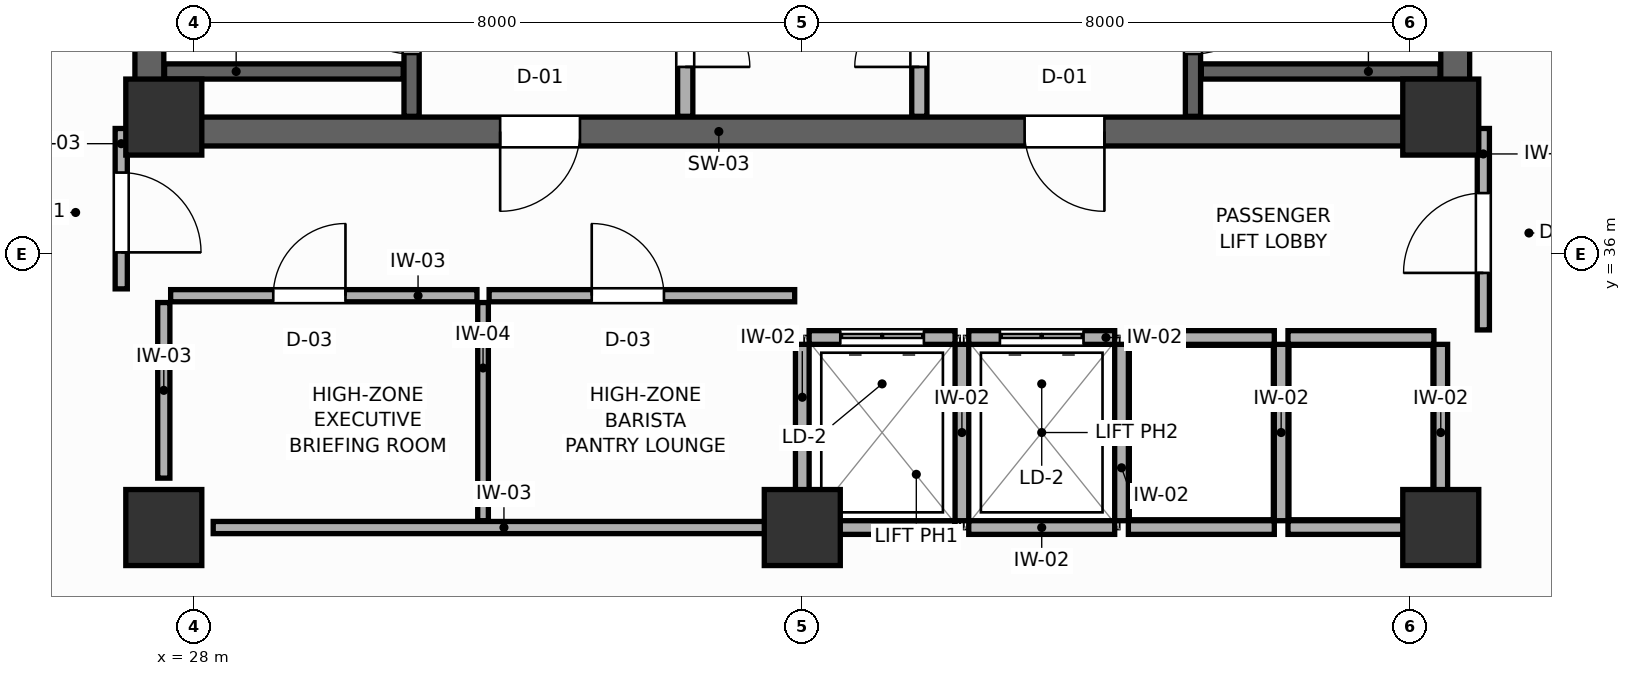
"""IFC4 building model, lengths in metres.
Left out: names, types, materials, properties, quantities, classifications, styles, units other than length and angle.
Written with IfcOpenShell. Run it as: python <this file> out.ifc"""

import sys

from ifc_helpers import new_model, si_unit, direction, frame, frame_2d, origin, origin_2d, place, context, subcontext, project, spatial, rectangle, extrude, source, transform, mapped, element, fill, save


model = new_model("IFC4")
c1 = context("Model", 3, precision=1e-05, world=origin(), true_north=direction((0.0, 1.0)))
c2 = subcontext(c1, "Body", "Model", "MODEL_VIEW")
j1 = project(units=[si_unit("LENGTHUNIT", "METRE"), si_unit("PLANEANGLEUNIT", "RADIAN")], contexts=[c1])
p1 = place(None, origin())
s1 = spatial("IfcSite", under=j1, at=p1, CompositionType="ELEMENT")
p2 = place(p1, origin())
s2 = spatial("IfcBuilding", under=s1, at=p2, CompositionType="ELEMENT")
p3 = place(p2, frame((0.0, 0.0, 231.0)))
s3 = spatial("IfcBuildingStorey", under=s2, at=p3, CompositionType="ELEMENT", Elevation=231.0)
p4 = place(p3, frame((27.22, 37.61, 0.0), z_axis=(0.0, 0.0, 1.0), x_axis=(1.0, 0.0, 0.0)))
e1 = element("IfcWall", 1, at=p4, inside=s3, PredefinedType="SHEAR", context=c2, shape_type="SweptSolid", body=[
    extrude(rectangle(XDim=17.56, YDim=0.38, at=frame_2d((8.78, 0.0))), origin(), (0.0, 0.0, 1.0), 3.6),
])
p5 = place(p4, frame((4.805, 0.0, 0.0)))
e2 = element("IfcOpeningElement", 2, at=p5, cuts=e1, PredefinedType="OPENING", context=c2, shape_type="SweptSolid", body=[
    extrude(rectangle(XDim=1.05, YDim=2.1, at=frame_2d((0.525, 1.05))), frame((0.0, 0.2, 0.0), z_axis=(0.0, -1.0, 0.0), x_axis=(1.0, 0.0, 0.0)), (0.0, 0.0, 1.0), 0.4),
])
p6 = place(p4, frame((11.705, 0.0, 0.0)))
e3 = element("IfcOpeningElement", 3, at=p6, cuts=e1, PredefinedType="OPENING", context=c2, shape_type="SweptSolid", body=[
    extrude(rectangle(XDim=1.05, YDim=2.1, at=frame_2d((0.525, 1.05))), frame((0.0, 0.2, 0.0), z_axis=(0.0, -1.0, 0.0), x_axis=(1.0, 0.0, 0.0)), (0.0, 0.0, 1.0), 0.4),
])
for number, where, z_axis, x_axis in (
    (4, (27.41, 37.8, 0.0), (0.0, 0.0, 1.0), (0.0, 1.0, 0.0)),
    (5, (44.59, 37.8, 0.0), (0.0, 0.0, 1.0), (0.0, 1.0, 0.0)),
):
    element("IfcWall", number, at=place(p3, frame(where, z_axis=z_axis, x_axis=x_axis)), inside=s3, PredefinedType="SHEAR", context=c2, shape_type="SweptSolid", body=[
        extrude(rectangle(XDim=9.0, YDim=0.38, at=frame_2d((4.5, 0.0))), origin(), (0.0, 0.0, 1.0), 3.6),
    ])
m1 = source(origin(), c2, "Body", "SweptSolid", [
    extrude(rectangle(XDim=1.0, YDim=1.0, at=origin_2d()), origin(), (0.0, 0.0, 1.0), 3.6),
])
for number, where, z_axis, x_axis in (
    (6, (27.6, 37.8, 0.0), (0.0, 0.0, 1.0), (1.0, 0.0, 0.0)),
    (7, (44.4, 37.8, 0.0), (0.0, 0.0, 1.0), (1.0, 0.0, 0.0)),
    (8, (27.6, 32.4, 0.0), (0.0, 0.0, 1.0), (1.0, 0.0, 0.0)),
    (9, (44.4, 32.4, 0.0), (0.0, 0.0, 1.0), (1.0, 0.0, 0.0)),
    (10, (36.0, 32.4, 0.0), (0.0, 0.0, 1.0), (1.0, 0.0, 0.0)),
):
    element("IfcColumn", number, at=place(p3, frame(where, z_axis=z_axis, x_axis=x_axis)), inside=s3, PredefinedType="COLUMN", context=c2, shape_type="MappedRepresentation", body=[
        mapped(m1, transform((0.0, 0.0, 0.0), scale=1.0)),
    ])
p7 = place(p3, frame((30.86, 37.81, 0.0), z_axis=(0.0, 0.0, 1.0), x_axis=(0.0, 1.0, 0.0)))
e11 = element("IfcWall", 11, at=p7, inside=s3, PredefinedType="SHEAR", context=c2, shape_type="SweptSolid", body=[
    extrude(rectangle(XDim=8.98, YDim=0.2, at=frame_2d((4.49, 0.0))), origin(), (0.0, 0.0, 1.0), 3.6),
])
p8 = place(p7, frame((0.82, 0.0, 0.0)))
e12 = element("IfcOpeningElement", 12, at=p8, cuts=e11, PredefinedType="OPENING", context=c2, shape_type="SweptSolid", body=[
    extrude(rectangle(XDim=1.05, YDim=2.1, at=frame_2d((0.525, 1.05))), frame((0.0, 0.11, 0.0), z_axis=(0.0, -1.0, 0.0), x_axis=(1.0, 0.0, 0.0)), (0.0, 0.0, 1.0), 0.22),
])
p9 = place(p3, frame((27.61, 38.4, 0.0), z_axis=(0.0, 0.0, 1.0), x_axis=(1.0, 0.0, 0.0)))
e13 = element("IfcWall", 13, at=p9, inside=s3, PredefinedType="SHEAR", context=c2, shape_type="SweptSolid", body=[
    extrude(rectangle(XDim=3.14, YDim=0.2, at=frame_2d((1.57, 0.0))), origin(), (0.0, 0.0, 1.0), 3.6),
])
p10 = place(p3, frame((41.14, 37.81, 0.0), z_axis=(0.0, 0.0, 1.0), x_axis=(0.0, 1.0, 0.0)))
e14 = element("IfcWall", 14, at=p10, inside=s3, PredefinedType="SHEAR", context=c2, shape_type="SweptSolid", body=[
    extrude(rectangle(XDim=8.98, YDim=0.2, at=frame_2d((4.49, 0.0))), origin(), (0.0, 0.0, 1.0), 3.6),
])
p11 = place(p10, frame((0.82, 0.0, 0.0)))
e15 = element("IfcOpeningElement", 15, at=p11, cuts=e14, PredefinedType="OPENING", context=c2, shape_type="SweptSolid", body=[
    extrude(rectangle(XDim=1.05, YDim=2.1, at=frame_2d((0.525, 1.05))), frame((0.0, 0.11, 0.0), z_axis=(0.0, -1.0, 0.0), x_axis=(1.0, 0.0, 0.0)), (0.0, 0.0, 1.0), 0.22),
])
p12 = place(p3, frame((41.25, 38.4, 0.0), z_axis=(0.0, 0.0, 1.0), x_axis=(1.0, 0.0, 0.0)))
e16 = element("IfcWall", 16, at=p12, inside=s3, PredefinedType="SHEAR", context=c2, shape_type="SweptSolid", body=[
    extrude(rectangle(XDim=3.14, YDim=0.2, at=frame_2d((1.57, 0.0))), origin(), (0.0, 0.0, 1.0), 3.6),
])
p13 = place(p3, frame((34.46, 37.81, 0.0), z_axis=(0.0, 0.0, 1.0), x_axis=(0.0, 1.0, 0.0)))
e17 = element("IfcWall", 17, at=p13, inside=s3, PredefinedType="PARTITIONING", context=c2, shape_type="SweptSolid", body=[
    extrude(rectangle(XDim=8.98, YDim=0.2, at=frame_2d((4.49, 0.0))), origin(), (0.0, 0.0, 1.0), 3.41),
])
p14 = place(p13, frame((0.65, 0.0, 0.0)))
e18 = element("IfcOpeningElement", 18, at=p14, cuts=e17, PredefinedType="OPENING", context=c2, shape_type="SweptSolid", body=[
    extrude(rectangle(XDim=0.85, YDim=2.05, at=frame_2d((0.425, 1.025))), frame((0.0, 0.11, 0.0), z_axis=(0.0, -1.0, 0.0), x_axis=(1.0, 0.0, 0.0)), (0.0, 0.0, 1.0), 0.22),
])
p15 = place(p3, frame((37.54, 37.81, 0.0), z_axis=(0.0, 0.0, 1.0), x_axis=(0.0, 1.0, 0.0)))
e19 = element("IfcWall", 19, at=p15, inside=s3, PredefinedType="PARTITIONING", context=c2, shape_type="SweptSolid", body=[
    extrude(rectangle(XDim=8.98, YDim=0.2, at=frame_2d((4.49, 0.0))), origin(), (0.0, 0.0, 1.0), 3.41),
])
p16 = place(p15, frame((0.65, 0.0, 0.0)))
e20 = element("IfcOpeningElement", 20, at=p16, cuts=e19, PredefinedType="OPENING", context=c2, shape_type="SweptSolid", body=[
    extrude(rectangle(XDim=0.85, YDim=2.05, at=frame_2d((0.425, 1.025))), frame((0.0, 0.11, 0.0), z_axis=(0.0, -1.0, 0.0), x_axis=(1.0, 0.0, 0.0)), (0.0, 0.0, 1.0), 0.22),
])
p17 = place(p3, frame((36.09, 34.9, 0.0), z_axis=(0.0, 0.0, 1.0), x_axis=(1.0, 0.0, 0.0)))
e21 = element("IfcWall", 21, at=p17, inside=s3, PredefinedType="PARTITIONING", context=c2, shape_type="SweptSolid", body=[
    extrude(rectangle(XDim=1.92, YDim=0.18, at=frame_2d((0.96, 0.0))), origin(), (0.0, 0.0, 1.0), 3.41),
])
p18 = place(p17, frame((0.41, 0.0, 0.0)))
e22 = element("IfcOpeningElement", 22, at=p18, cuts=e21, PredefinedType="OPENING", context=c2, shape_type="SweptSolid", body=[
    extrude(rectangle(XDim=1.1, YDim=2.1, at=frame_2d((0.55, 1.05))), frame((0.0, 0.1, 0.0), z_axis=(0.0, -1.0, 0.0), x_axis=(1.0, 0.0, 0.0)), (0.0, 0.0, 1.0), 0.2),
])
p19 = place(p3, frame((36.09, 32.4, 0.0), z_axis=(0.0, 0.0, 1.0), x_axis=(1.0, 0.0, 0.0)))
e23 = element("IfcWall", 23, at=p19, inside=s3, PredefinedType="PARTITIONING", context=c2, shape_type="SweptSolid", body=[
    extrude(rectangle(XDim=1.92, YDim=0.18, at=frame_2d((0.96, 0.0))), origin(), (0.0, 0.0, 1.0), 2.96),
])
p20 = place(p3, frame((36.0, 32.49, 0.0), z_axis=(0.0, 0.0, 1.0), x_axis=(0.0, 1.0, 0.0)))
e24 = element("IfcWall", 24, at=p20, inside=s3, PredefinedType="PARTITIONING", context=c2, shape_type="SweptSolid", body=[
    extrude(rectangle(XDim=2.32, YDim=0.18, at=frame_2d((1.16, 0.0))), origin(), (0.0, 0.0, 1.0), 3.41),
])
p21 = place(p3, frame((38.19, 34.9, 0.0), z_axis=(0.0, 0.0, 1.0), x_axis=(1.0, 0.0, 0.0)))
e25 = element("IfcWall", 25, at=p21, inside=s3, PredefinedType="PARTITIONING", context=c2, shape_type="SweptSolid", body=[
    extrude(rectangle(XDim=1.92, YDim=0.18, at=frame_2d((0.96, 0.0))), origin(), (0.0, 0.0, 1.0), 3.41),
])
p22 = place(p21, frame((0.41, 0.0, 0.0)))
e26 = element("IfcOpeningElement", 26, at=p22, cuts=e25, PredefinedType="OPENING", context=c2, shape_type="SweptSolid", body=[
    extrude(rectangle(XDim=1.1, YDim=2.1, at=frame_2d((0.55, 1.05))), frame((0.0, 0.1, 0.0), z_axis=(0.0, -1.0, 0.0), x_axis=(1.0, 0.0, 0.0)), (0.0, 0.0, 1.0), 0.2),
])
p23 = place(p3, frame((38.19, 32.4, 0.0), z_axis=(0.0, 0.0, 1.0), x_axis=(1.0, 0.0, 0.0)))
e27 = element("IfcWall", 27, at=p23, inside=s3, PredefinedType="PARTITIONING", context=c2, shape_type="SweptSolid", body=[
    extrude(rectangle(XDim=1.92, YDim=0.18, at=frame_2d((0.96, 0.0))), origin(), (0.0, 0.0, 1.0), 2.96),
])
p24 = place(p3, frame((38.1, 32.49, 0.0), z_axis=(0.0, 0.0, 1.0), x_axis=(0.0, 1.0, 0.0)))
e28 = element("IfcWall", 28, at=p24, inside=s3, PredefinedType="PARTITIONING", context=c2, shape_type="SweptSolid", body=[
    extrude(rectangle(XDim=2.32, YDim=0.18, at=frame_2d((1.16, 0.0))), origin(), (0.0, 0.0, 1.0), 3.41),
])
p25 = place(p3, frame((40.29, 34.9, 0.0), z_axis=(0.0, 0.0, 1.0), x_axis=(1.0, 0.0, 0.0)))
e29 = element("IfcWall", 29, at=p25, inside=s3, PredefinedType="PARTITIONING", context=c2, shape_type="SweptSolid", body=[
    extrude(rectangle(XDim=1.92, YDim=0.18, at=frame_2d((0.96, 0.0))), origin(), (0.0, 0.0, 1.0), 3.41),
])
p26 = place(p3, frame((40.29, 32.4, 0.0), z_axis=(0.0, 0.0, 1.0), x_axis=(1.0, 0.0, 0.0)))
e30 = element("IfcWall", 30, at=p26, inside=s3, PredefinedType="PARTITIONING", context=c2, shape_type="SweptSolid", body=[
    extrude(rectangle(XDim=1.92, YDim=0.18, at=frame_2d((0.96, 0.0))), origin(), (0.0, 0.0, 1.0), 2.96),
])
p27 = place(p3, frame((40.2, 32.49, 0.0), z_axis=(0.0, 0.0, 1.0), x_axis=(0.0, 1.0, 0.0)))
e31 = element("IfcWall", 31, at=p27, inside=s3, PredefinedType="PARTITIONING", context=c2, shape_type="SweptSolid", body=[
    extrude(rectangle(XDim=2.32, YDim=0.18, at=frame_2d((1.16, 0.0))), origin(), (0.0, 0.0, 1.0), 3.41),
])
p28 = place(p3, frame((42.39, 34.9, 0.0), z_axis=(0.0, 0.0, 1.0), x_axis=(1.0, 0.0, 0.0)))
e32 = element("IfcWall", 32, at=p28, inside=s3, PredefinedType="PARTITIONING", context=c2, shape_type="SweptSolid", body=[
    extrude(rectangle(XDim=1.92, YDim=0.18, at=frame_2d((0.96, 0.0))), origin(), (0.0, 0.0, 1.0), 3.41),
])
p29 = place(p3, frame((42.39, 32.4, 0.0), z_axis=(0.0, 0.0, 1.0), x_axis=(1.0, 0.0, 0.0)))
e33 = element("IfcWall", 33, at=p29, inside=s3, PredefinedType="PARTITIONING", context=c2, shape_type="SweptSolid", body=[
    extrude(rectangle(XDim=1.92, YDim=0.18, at=frame_2d((0.96, 0.0))), origin(), (0.0, 0.0, 1.0), 2.96),
])
for number, where, z_axis, x_axis in (
    (34, (42.3, 32.49, 0.0), (0.0, 0.0, 1.0), (0.0, 1.0, 0.0)),
    (35, (44.4, 32.49, 0.0), (0.0, 0.0, 1.0), (0.0, 1.0, 0.0)),
):
    element("IfcWall", number, at=place(p3, frame(where, z_axis=z_axis, x_axis=x_axis)), inside=s3, PredefinedType="PARTITIONING", context=c2, shape_type="SweptSolid", body=[
        extrude(rectangle(XDim=2.32, YDim=0.18, at=frame_2d((1.16, 0.0))), origin(), (0.0, 0.0, 1.0), 3.41),
    ])
p30 = place(p3, frame((28.25, 32.4, 0.0), z_axis=(0.0, 0.0, 1.0), x_axis=(1.0, 0.0, 0.0)))
e36 = element("IfcWall", 36, at=p30, inside=s3, PredefinedType="PARTITIONING", context=c2, shape_type="SweptSolid", body=[
    extrude(rectangle(XDim=7.65, YDim=0.16, at=frame_2d((3.825, 0.0))), origin(), (0.0, 0.0, 1.0), 2.96),
])
p31 = place(p3, frame((27.6, 33.05, 0.0), z_axis=(0.0, 0.0, 1.0), x_axis=(0.0, 1.0, 0.0)))
e37 = element("IfcWall", 37, at=p31, inside=s3, PredefinedType="PARTITIONING", context=c2, shape_type="SweptSolid", body=[
    extrude(rectangle(XDim=2.31, YDim=0.16, at=frame_2d((1.155, 0.0))), origin(), (0.0, 0.0, 1.0), 3.41),
])
p32 = place(p3, frame((31.8, 32.49, 0.0), z_axis=(0.0, 0.0, 1.0), x_axis=(0.0, 1.0, 0.0)))
e38 = element("IfcWall", 38, at=p32, inside=s3, PredefinedType="PARTITIONING", context=c2, shape_type="SweptSolid", body=[
    extrude(rectangle(XDim=2.87, YDim=0.14, at=frame_2d((1.435, 0.0))), origin(), (0.0, 0.0, 1.0), 3.41),
])
p33 = place(p3, frame((27.69, 35.45, 0.0), z_axis=(0.0, 0.0, 1.0), x_axis=(1.0, 0.0, 0.0)))
e39 = element("IfcWall", 39, at=p33, inside=s3, PredefinedType="PARTITIONING", context=c2, shape_type="SweptSolid", body=[
    extrude(rectangle(XDim=4.03, YDim=0.16, at=frame_2d((2.015, 0.0))), origin(), (0.0, 0.0, 1.0), 3.41),
])
p34 = place(p33, frame((1.35, 0.0, 0.0)))
e40 = element("IfcOpeningElement", 40, at=p34, cuts=e39, PredefinedType="OPENING", context=c2, shape_type="SweptSolid", body=[
    extrude(rectangle(XDim=0.95, YDim=2.05, at=frame_2d((0.475, 1.025))), frame((0.0, 0.09, 0.0), z_axis=(0.0, -1.0, 0.0), x_axis=(1.0, 0.0, 0.0)), (0.0, 0.0, 1.0), 0.18),
])
p35 = place(p3, frame((31.88, 35.45, 0.0), z_axis=(0.0, 0.0, 1.0), x_axis=(1.0, 0.0, 0.0)))
e41 = element("IfcWall", 41, at=p35, inside=s3, PredefinedType="PARTITIONING", context=c2, shape_type="SweptSolid", body=[
    extrude(rectangle(XDim=4.02, YDim=0.16, at=frame_2d((2.01, 0.0))), origin(), (0.0, 0.0, 1.0), 3.41),
])
p36 = place(p35, frame((1.35, 0.0, 0.0)))
e42 = element("IfcOpeningElement", 42, at=p36, cuts=e41, PredefinedType="OPENING", context=c2, shape_type="SweptSolid", body=[
    extrude(rectangle(XDim=0.95, YDim=2.05, at=frame_2d((0.475, 1.025))), frame((0.0, 0.09, 0.0), z_axis=(0.0, -1.0, 0.0), x_axis=(1.0, 0.0, 0.0)), (0.0, 0.0, 1.0), 0.18),
])
p37 = place(p3, frame((27.04, 35.54, 0.0), z_axis=(0.0, 0.0, 1.0), x_axis=(0.0, 1.0, 0.0)))
e43 = element("IfcWall", 43, at=p37, inside=s3, PredefinedType="PARTITIONING", context=c2, shape_type="SweptSolid", body=[
    extrude(rectangle(XDim=2.11, YDim=0.16, at=frame_2d((1.055, 0.0))), origin(), (0.0, 0.0, 1.0), 3.41),
])
p38 = place(p37, frame((0.48, 0.0, 0.0)))
e44 = element("IfcOpeningElement", 44, at=p38, cuts=e43, PredefinedType="OPENING", context=c2, shape_type="SweptSolid", body=[
    extrude(rectangle(XDim=1.05, YDim=2.1, at=frame_2d((0.525, 1.05))), frame((0.0, 0.09, 0.0), z_axis=(0.0, -1.0, 0.0), x_axis=(1.0, 0.0, 0.0)), (0.0, 0.0, 1.0), 0.18),
])
p39 = place(p3, frame((44.96, 35.0, 0.0), z_axis=(0.0, 0.0, 1.0), x_axis=(0.0, 1.0, 0.0)))
e45 = element("IfcWall", 45, at=p39, inside=s3, PredefinedType="PARTITIONING", context=c2, shape_type="SweptSolid", body=[
    extrude(rectangle(XDim=2.65, YDim=0.16, at=frame_2d((1.325, 0.0))), origin(), (0.0, 0.0, 1.0), 3.41),
])
p40 = place(p39, frame((0.75, 0.0, 0.0)))
e46 = element("IfcOpeningElement", 46, at=p40, cuts=e45, PredefinedType="OPENING", context=c2, shape_type="SweptSolid", body=[
    extrude(rectangle(XDim=1.05, YDim=2.1, at=frame_2d((0.525, 1.05))), frame((0.0, 0.09, 0.0), z_axis=(0.0, -1.0, 0.0), x_axis=(1.0, 0.0, 0.0)), (0.0, 0.0, 1.0), 0.18),
])
p41 = place(p8, origin())
e47 = element("IfcDoor", 47, at=p41, inside=s3, OperationType="SINGLE_SWING_RIGHT", PredefinedType="DOOR", context=c2, shape_type="SweptSolid", body=[
    extrude(rectangle(XDim=1.05, YDim=2.1, at=frame_2d((0.525, 1.05))), frame((0.0, 0.025, 0.0), z_axis=(0.0, -1.0, 0.0), x_axis=(1.0, 0.0, 0.0)), (0.0, 0.0, 1.0), 0.05),
])
fill(e12, e47)
p42 = place(p11, frame((1.05, 0.0, 0.0), z_axis=(0.0, 0.0, 1.0), x_axis=(-1.0, 0.0, 0.0)))
e48 = element("IfcDoor", 48, at=p42, inside=s3, OperationType="SINGLE_SWING_LEFT", PredefinedType="DOOR", context=c2, shape_type="SweptSolid", body=[
    extrude(rectangle(XDim=1.05, YDim=2.1, at=frame_2d((0.525, 1.05))), frame((0.0, 0.025, 0.0), z_axis=(0.0, -1.0, 0.0), x_axis=(1.0, 0.0, 0.0)), (0.0, 0.0, 1.0), 0.05),
])
fill(e15, e48)
p43 = place(p14, frame((0.85, 0.0, 0.0), z_axis=(0.0, 0.0, 1.0), x_axis=(-1.0, 0.0, 0.0)))
e49 = element("IfcDoor", 49, at=p43, inside=s3, OperationType="SINGLE_SWING_RIGHT", PredefinedType="DOOR", context=c2, shape_type="SweptSolid", body=[
    extrude(rectangle(XDim=0.85, YDim=2.05, at=frame_2d((0.425, 1.025))), frame((0.0, 0.025, 0.0), z_axis=(0.0, -1.0, 0.0), x_axis=(1.0, 0.0, 0.0)), (0.0, 0.0, 1.0), 0.05),
])
fill(e18, e49)
p44 = place(p16, origin())
e50 = element("IfcDoor", 50, at=p44, inside=s3, OperationType="SINGLE_SWING_LEFT", PredefinedType="DOOR", context=c2, shape_type="SweptSolid", body=[
    extrude(rectangle(XDim=0.85, YDim=2.05, at=frame_2d((0.425, 1.025))), frame((0.0, 0.025, 0.0), z_axis=(0.0, -1.0, 0.0), x_axis=(1.0, 0.0, 0.0)), (0.0, 0.0, 1.0), 0.05),
])
fill(e20, e50)
p45 = place(p18, origin())
e51 = element("IfcDoor", 51, at=p45, inside=s3, OperationType="DOUBLE_DOOR_SLIDING", PredefinedType="DOOR", context=c2, shape_type="SweptSolid", body=[
    extrude(rectangle(XDim=1.1, YDim=2.1, at=frame_2d((0.55, 1.05))), frame((0.0, 0.025, 0.0), z_axis=(0.0, -1.0, 0.0), x_axis=(1.0, 0.0, 0.0)), (0.0, 0.0, 1.0), 0.05),
])
fill(e22, e51)
p46 = place(p22, origin())
e52 = element("IfcDoor", 52, at=p46, inside=s3, OperationType="DOUBLE_DOOR_SLIDING", PredefinedType="DOOR", context=c2, shape_type="SweptSolid", body=[
    extrude(rectangle(XDim=1.1, YDim=2.1, at=frame_2d((0.55, 1.05))), frame((0.0, 0.025, 0.0), z_axis=(0.0, -1.0, 0.0), x_axis=(1.0, 0.0, 0.0)), (0.0, 0.0, 1.0), 0.05),
])
fill(e26, e52)
p47 = place(p34, origin())
e53 = element("IfcDoor", 53, at=p47, inside=s3, OperationType="SINGLE_SWING_RIGHT", PredefinedType="DOOR", context=c2, shape_type="SweptSolid", body=[
    extrude(rectangle(XDim=0.95, YDim=2.05, at=frame_2d((0.475, 1.025))), frame((0.0, 0.025, 0.0), z_axis=(0.0, -1.0, 0.0), x_axis=(1.0, 0.0, 0.0)), (0.0, 0.0, 1.0), 0.05),
])
fill(e40, e53)
p48 = place(p36, origin())
e54 = element("IfcDoor", 54, at=p48, inside=s3, OperationType="SINGLE_SWING_LEFT", PredefinedType="DOOR", context=c2, shape_type="SweptSolid", body=[
    extrude(rectangle(XDim=0.95, YDim=2.05, at=frame_2d((0.475, 1.025))), frame((0.0, 0.025, 0.0), z_axis=(0.0, -1.0, 0.0), x_axis=(1.0, 0.0, 0.0)), (0.0, 0.0, 1.0), 0.05),
])
fill(e42, e54)
p49 = place(p38, frame((1.05, 0.0, 0.0), z_axis=(0.0, 0.0, 1.0), x_axis=(-1.0, 0.0, 0.0)))
e55 = element("IfcDoor", 55, at=p49, inside=s3, OperationType="SINGLE_SWING_RIGHT", PredefinedType="DOOR", context=c2, shape_type="SweptSolid", body=[
    extrude(rectangle(XDim=1.05, YDim=2.1, at=frame_2d((0.525, 1.05))), frame((0.0, 0.025, 0.0), z_axis=(0.0, -1.0, 0.0), x_axis=(1.0, 0.0, 0.0)), (0.0, 0.0, 1.0), 0.05),
])
fill(e44, e55)
p50 = place(p40, origin())
e56 = element("IfcDoor", 56, at=p50, inside=s3, OperationType="SINGLE_SWING_LEFT", PredefinedType="DOOR", context=c2, shape_type="SweptSolid", body=[
    extrude(rectangle(XDim=1.05, YDim=2.1, at=frame_2d((0.525, 1.05))), frame((0.0, 0.025, 0.0), z_axis=(0.0, -1.0, 0.0), x_axis=(1.0, 0.0, 0.0)), (0.0, 0.0, 1.0), 0.05),
])
fill(e46, e56)
p51 = place(p5, frame((1.05, 0.0, 0.0), z_axis=(0.0, 0.0, 1.0), x_axis=(-1.0, 0.0, 0.0)))
e57 = element("IfcDoor", 57, at=p51, inside=s3, OperationType="SINGLE_SWING_RIGHT", PredefinedType="DOOR", context=c2, shape_type="SweptSolid", body=[
    extrude(rectangle(XDim=1.05, YDim=2.1, at=frame_2d((0.525, 1.05))), frame((0.0, 0.025, 0.0), z_axis=(0.0, -1.0, 0.0), x_axis=(1.0, 0.0, 0.0)), (0.0, 0.0, 1.0), 0.05),
])
fill(e2, e57)
p52 = place(p6, frame((1.05, 0.0, 0.0), z_axis=(0.0, 0.0, 1.0), x_axis=(-1.0, 0.0, 0.0)))
e58 = element("IfcDoor", 58, at=p52, inside=s3, OperationType="SINGLE_SWING_LEFT", PredefinedType="DOOR", context=c2, shape_type="SweptSolid", body=[
    extrude(rectangle(XDim=1.05, YDim=2.1, at=frame_2d((0.525, 1.05))), frame((0.0, 0.025, 0.0), z_axis=(0.0, -1.0, 0.0), x_axis=(1.0, 0.0, 0.0)), (0.0, 0.0, 1.0), 0.05),
])
fill(e3, e58)
save(model, sys.argv[1])
